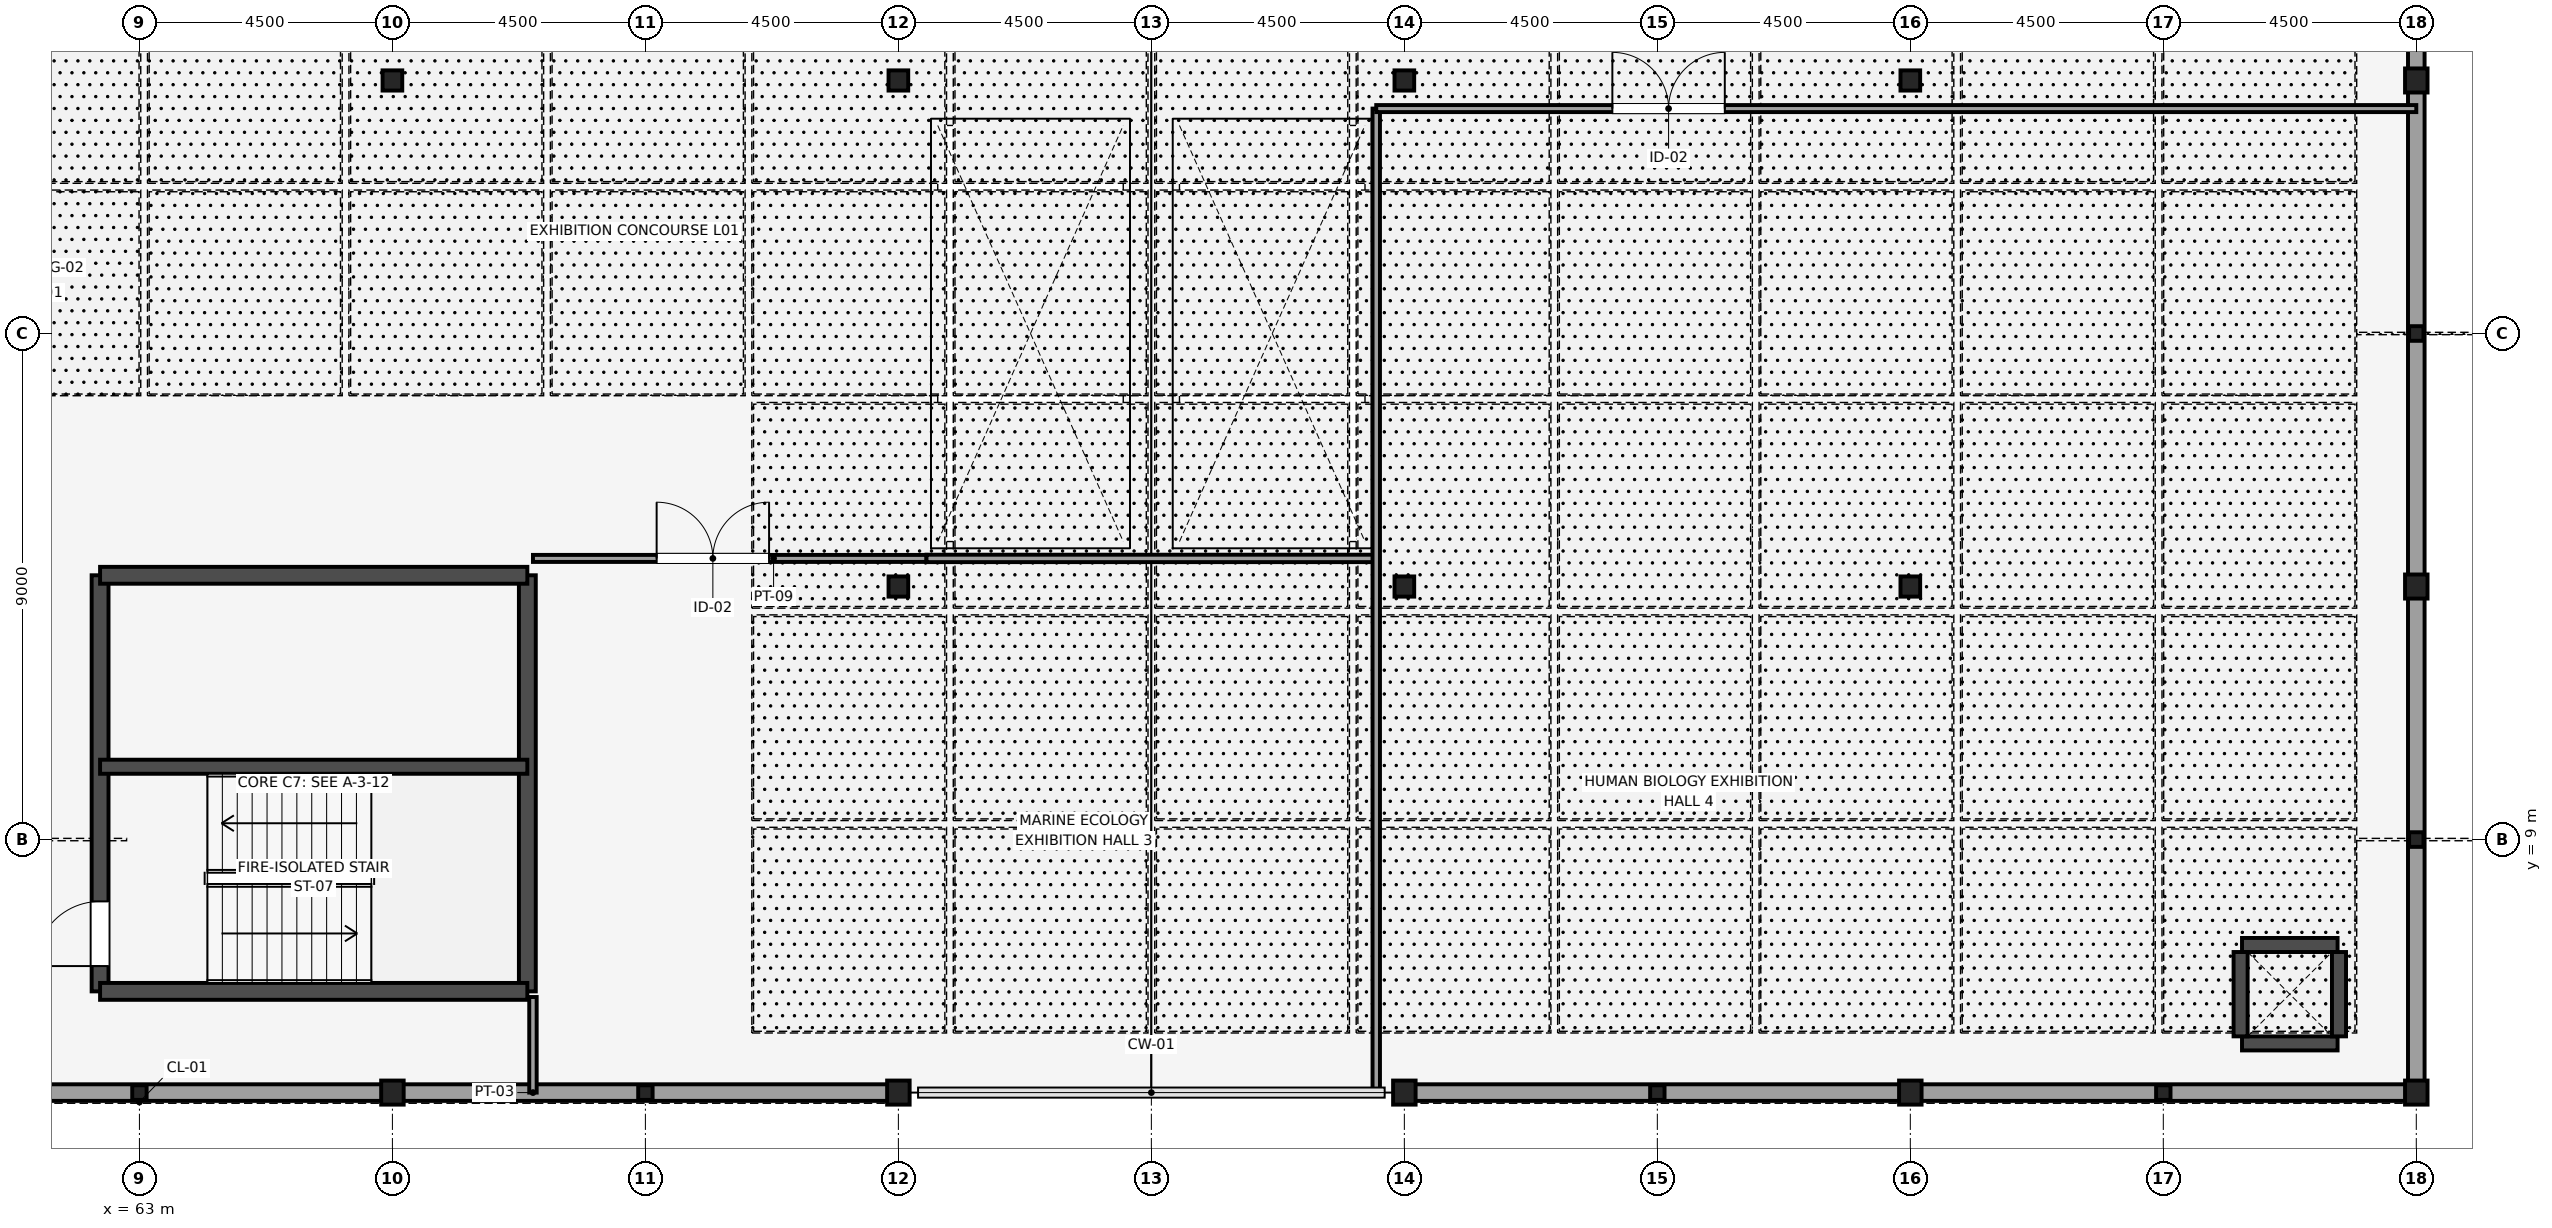
"""IFC4 building model, lengths in metres.
Left out: names, types, materials, properties, quantities, classifications, styles, units other than length and angle.
Written with IfcOpenShell. Run it as: python <this file> out.ifc"""

import sys

from ifc_helpers import new_model, si_unit, direction, frame, frame_2d, origin, origin_2d, place, context, subcontext, project, spatial, rectangle, i_section, extrude, element, fill, save


model = new_model("IFC4")
c1 = context("Model", 3, precision=1e-05, world=origin(), true_north=direction((0.0, 1.0)))
c2 = subcontext(c1, "Body", "Model", "MODEL_VIEW")
j1 = project(units=[si_unit("LENGTHUNIT", "METRE"), si_unit("PLANEANGLEUNIT", "RADIAN")], contexts=[c1])
p1 = place(None, origin())
s1 = spatial("IfcSite", under=j1, at=p1, CompositionType="ELEMENT")
p2 = place(p1, origin())
s2 = spatial("IfcBuilding", under=s1, at=p2, CompositionType="ELEMENT")
p3 = place(p2, frame((0.0, 0.0, 5.4)))
s3 = spatial("IfcBuildingStorey", under=s2, at=p3, CompositionType="ELEMENT", Elevation=5.4)
p4 = place(p3, frame((67.5, 4.5, 0.0), z_axis=(0.0, 0.0, 1.0), x_axis=(1.0, 0.0, 0.0)))
e1 = element("IfcColumn", 1, at=p4, inside=s3, PredefinedType="COLUMN", context=c2, shape_type="SweptSolid", body=[
    extrude(i_section(OverallWidth=0.4, OverallDepth=0.428, WebThickness=0.02, FlangeThickness=0.028, FilletRadius=0.016, at=origin_2d()), origin(), (0.0, 0.0, 1.0), 4.5),
])
p5 = place(p3, frame((67.5, 22.5, 0.0), z_axis=(0.0, 0.0, 1.0), x_axis=(1.0, 0.0, 0.0)))
e2 = element("IfcColumn", 2, at=p5, inside=s3, PredefinedType="COLUMN", context=c2, shape_type="SweptSolid", body=[
    extrude(i_section(OverallWidth=0.35, OverallDepth=0.359, WebThickness=0.016, FlangeThickness=0.024, FilletRadius=0.014, at=origin_2d()), origin(), (0.0, 0.0, 1.0), 4.5),
])
p6 = place(p3, frame((76.5, 4.5, 0.0), z_axis=(0.0, 0.0, 1.0), x_axis=(1.0, 0.0, 0.0)))
e3 = element("IfcColumn", 3, at=p6, inside=s3, PredefinedType="COLUMN", context=c2, shape_type="SweptSolid", body=[
    extrude(i_section(OverallWidth=0.4, OverallDepth=0.428, WebThickness=0.02, FlangeThickness=0.028, FilletRadius=0.016, at=origin_2d()), origin(), (0.0, 0.0, 1.0), 4.5),
])
for number, where, z_axis, x_axis in (
    (4, (76.5, 13.5, 0.0), (0.0, 0.0, 1.0), (1.0, 0.0, 0.0)),
    (5, (76.5, 22.5, 0.0), (0.0, 0.0, 1.0), (1.0, 0.0, 0.0)),
):
    element("IfcColumn", number, at=place(p3, frame(where, z_axis=z_axis, x_axis=x_axis)), inside=s3, PredefinedType="COLUMN", context=c2, shape_type="SweptSolid", body=[
        extrude(i_section(OverallWidth=0.35, OverallDepth=0.359, WebThickness=0.016, FlangeThickness=0.024, FilletRadius=0.014, at=origin_2d()), origin(), (0.0, 0.0, 1.0), 4.5),
    ])
p7 = place(p3, frame((85.5, 4.5, 0.0), z_axis=(0.0, 0.0, 1.0), x_axis=(1.0, 0.0, 0.0)))
e6 = element("IfcColumn", 6, at=p7, inside=s3, PredefinedType="COLUMN", context=c2, shape_type="SweptSolid", body=[
    extrude(i_section(OverallWidth=0.4, OverallDepth=0.428, WebThickness=0.02, FlangeThickness=0.028, FilletRadius=0.016, at=origin_2d()), origin(), (0.0, 0.0, 1.0), 4.5),
])
for number, where, z_axis, x_axis in (
    (7, (85.5, 13.5, 0.0), (0.0, 0.0, 1.0), (1.0, 0.0, 0.0)),
    (8, (85.5, 22.5, 0.0), (0.0, 0.0, 1.0), (1.0, 0.0, 0.0)),
):
    element("IfcColumn", number, at=place(p3, frame(where, z_axis=z_axis, x_axis=x_axis)), inside=s3, PredefinedType="COLUMN", context=c2, shape_type="SweptSolid", body=[
        extrude(i_section(OverallWidth=0.35, OverallDepth=0.359, WebThickness=0.016, FlangeThickness=0.024, FilletRadius=0.014, at=origin_2d()), origin(), (0.0, 0.0, 1.0), 4.5),
    ])
p8 = place(p3, frame((94.5, 4.5, 0.0), z_axis=(0.0, 0.0, 1.0), x_axis=(1.0, 0.0, 0.0)))
e9 = element("IfcColumn", 9, at=p8, inside=s3, PredefinedType="COLUMN", context=c2, shape_type="SweptSolid", body=[
    extrude(i_section(OverallWidth=0.4, OverallDepth=0.428, WebThickness=0.02, FlangeThickness=0.028, FilletRadius=0.016, at=origin_2d()), origin(), (0.0, 0.0, 1.0), 4.5),
])
for number, where, z_axis, x_axis in (
    (10, (94.5, 13.5, 0.0), (0.0, 0.0, 1.0), (1.0, 0.0, 0.0)),
    (11, (94.5, 22.5, 0.0), (0.0, 0.0, 1.0), (1.0, 0.0, 0.0)),
):
    element("IfcColumn", number, at=place(p3, frame(where, z_axis=z_axis, x_axis=x_axis)), inside=s3, PredefinedType="COLUMN", context=c2, shape_type="SweptSolid", body=[
        extrude(i_section(OverallWidth=0.35, OverallDepth=0.359, WebThickness=0.016, FlangeThickness=0.024, FilletRadius=0.014, at=origin_2d()), origin(), (0.0, 0.0, 1.0), 4.5),
    ])
for number, where, z_axis, x_axis in (
    (12, (103.5, 4.5, 0.0), (0.0, 0.0, 1.0), (1.0, 0.0, 0.0)),
    (13, (103.5, 13.5, 0.0), (0.0, 0.0, 1.0), (1.0, 0.0, 0.0)),
    (14, (103.5, 22.5, 0.0), (0.0, 0.0, 1.0), (1.0, 0.0, 0.0)),
):
    element("IfcColumn", number, at=place(p3, frame(where, z_axis=z_axis, x_axis=x_axis)), inside=s3, PredefinedType="COLUMN", context=c2, shape_type="SweptSolid", body=[
        extrude(i_section(OverallWidth=0.4, OverallDepth=0.428, WebThickness=0.02, FlangeThickness=0.028, FilletRadius=0.016, at=origin_2d()), origin(), (0.0, 0.0, 1.0), 4.5),
    ])
for number, where, z_axis, x_axis in (
    (15, (63.0, 4.5, 0.0), (0.0, 0.0, 1.0), (1.0, 0.0, 0.0)),
    (16, (72.0, 4.5, 0.0), (0.0, 0.0, 1.0), (1.0, 0.0, 0.0)),
    (17, (90.0, 4.5, 0.0), (0.0, 0.0, 1.0), (1.0, 0.0, 0.0)),
    (18, (99.0, 4.5, 0.0), (0.0, 0.0, 1.0), (1.0, 0.0, 0.0)),
    (19, (103.5, 9.0, 0.0), (0.0, 0.0, 1.0), (1.0, 0.0, 0.0)),
    (20, (103.5, 18.0, 0.0), (0.0, 0.0, 1.0), (1.0, 0.0, 0.0)),
):
    element("IfcColumn", number, at=place(p3, frame(where, z_axis=z_axis, x_axis=x_axis)), inside=s3, PredefinedType="PILASTER", context=c2, shape_type="SweptSolid", body=[
        extrude(i_section(OverallWidth=0.256, OverallDepth=0.26, WebThickness=0.01, FlangeThickness=0.017, FilletRadius=0.014, at=origin_2d()), origin(), (0.0, 0.0, 1.0), 4.5),
    ])
p9 = place(p3, frame((62.3, 6.3, 0.0), z_axis=(0.0, 0.0, 1.0), x_axis=(0.0, 1.0, 0.0)))
e21 = element("IfcWall", 21, at=p9, inside=s3, PredefinedType="SHEAR", context=c2, shape_type="SweptSolid", body=[
    extrude(rectangle(XDim=7.4, YDim=0.3, at=frame_2d((3.7, 0.0))), origin(), (0.0, 0.0, 1.0), 4.5),
])
p10 = place(p9, frame((0.45, 0.0, 0.0)))
e22 = element("IfcOpeningElement", 22, at=p10, cuts=e21, PredefinedType="OPENING", context=c2, shape_type="SweptSolid", body=[
    extrude(rectangle(XDim=1.15, YDim=2.15, at=frame_2d((0.575, 1.075))), frame((0.0, 0.16, 0.0), z_axis=(0.0, -1.0, 0.0), x_axis=(1.0, 0.0, 0.0)), (0.0, 0.0, 1.0), 0.32),
])
p11 = place(p3, frame((69.9, 6.3, 0.0), z_axis=(0.0, 0.0, 1.0), x_axis=(0.0, 1.0, 0.0)))
e23 = element("IfcWall", 23, at=p11, inside=s3, PredefinedType="SHEAR", context=c2, shape_type="SweptSolid", body=[
    extrude(rectangle(XDim=7.4, YDim=0.3, at=frame_2d((3.7, 0.0))), origin(), (0.0, 0.0, 1.0), 4.5),
])
for number, where, z_axis, x_axis in (
    (24, (62.3, 6.3, 0.0), (0.0, 0.0, 1.0), (1.0, 0.0, 0.0)),
    (25, (62.3, 13.7, 0.0), (0.0, 0.0, 1.0), (1.0, 0.0, 0.0)),
):
    element("IfcWall", number, at=place(p3, frame(where, z_axis=z_axis, x_axis=x_axis)), inside=s3, PredefinedType="SHEAR", context=c2, shape_type="SweptSolid", body=[
        extrude(rectangle(XDim=7.6, YDim=0.3, at=frame_2d((3.8, 0.0))), origin(), (0.0, 0.0, 1.0), 4.5),
    ])
p12 = place(p3, frame((62.3, 10.295, 0.0), z_axis=(0.0, 0.0, 1.0), x_axis=(1.0, 0.0, 0.0)))
e26 = element("IfcWall", 26, at=p12, inside=s3, PredefinedType="SHEAR", context=c2, shape_type="SweptSolid", body=[
    extrude(rectangle(XDim=7.6, YDim=0.25, at=frame_2d((3.8, 0.0))), origin(), (0.0, 0.0, 1.0), 4.5),
])
for number, where, z_axis, x_axis in (
    (27, (100.4, 5.375, 0.0), (0.0, 0.0, 1.0), (1.0, 0.0, 0.0)),
    (28, (100.4, 7.125, 0.0), (0.0, 0.0, 1.0), (1.0, 0.0, 0.0)),
):
    element("IfcWall", number, at=place(p3, frame(where, z_axis=z_axis, x_axis=x_axis)), inside=s3, PredefinedType="SHEAR", context=c2, shape_type="SweptSolid", body=[
        extrude(rectangle(XDim=1.7, YDim=0.25, at=frame_2d((0.85, 0.0))), origin(), (0.0, 0.0, 1.0), 3.77),
    ])
for number, where, z_axis, x_axis in (
    (29, (100.375, 5.5, 0.0), (0.0, 0.0, 1.0), (0.0, 1.0, 0.0)),
    (30, (102.125, 5.5, 0.0), (0.0, 0.0, 1.0), (0.0, 1.0, 0.0)),
):
    element("IfcWall", number, at=place(p3, frame(where, z_axis=z_axis, x_axis=x_axis)), inside=s3, PredefinedType="SHEAR", context=c2, shape_type="SweptSolid", body=[
        extrude(rectangle(XDim=1.5, YDim=0.25, at=frame_2d((0.75, 0.0))), origin(), (0.0, 0.0, 1.0), 3.77),
    ])
for number, where, z_axis, x_axis in (
    (31, (58.5, 4.5, 0.0), (0.0, 0.0, 1.0), (1.0, 0.0, 0.0)),
    (32, (67.5, 4.5, 0.0), (0.0, 0.0, 1.0), (1.0, 0.0, 0.0)),
    (33, (85.5, 4.5, 0.0), (0.0, 0.0, 1.0), (1.0, 0.0, 0.0)),
    (34, (94.5, 4.5, 0.0), (0.0, 0.0, 1.0), (1.0, 0.0, 0.0)),
    (35, (103.5, 4.5, 0.0), (0.0, 0.0, 1.0), (0.0, 1.0, 0.0)),
    (36, (103.5, 13.5, 0.0), (0.0, 0.0, 1.0), (0.0, 1.0, 0.0)),
    (37, (103.5, 22.5, 0.0), (0.0, 0.0, 1.0), (0.0, 1.0, 0.0)),
):
    element("IfcWall", number, at=place(p3, frame(where, z_axis=z_axis, x_axis=x_axis)), inside=s3, PredefinedType="STANDARD", context=c2, shape_type="SweptSolid", body=[
        extrude(rectangle(XDim=9.0, YDim=0.295, at=frame_2d((4.5, 0.0))), origin(), (0.0, 0.0, 1.0), 3.846),
    ])
p13 = place(p3, frame((70.0, 4.5, 0.0), z_axis=(0.0, 0.0, 1.0), x_axis=(0.0, 1.0, 0.0)))
e38 = element("IfcWall", 38, at=p13, inside=s3, PredefinedType="PARTITIONING", context=c2, shape_type="SweptSolid", body=[
    extrude(rectangle(XDim=1.7, YDim=0.132, at=frame_2d((0.85, 0.0))), origin(), (0.0, 0.0, 1.0), 4.32),
])
p14 = place(p3, frame((70.0, 14.0, 0.0), z_axis=(0.0, 0.0, 1.0), x_axis=(1.0, 0.0, 0.0)))
e39 = element("IfcWall", 39, at=p14, inside=s3, PredefinedType="MOVABLE", context=c2, shape_type="SweptSolid", body=[
    extrude(rectangle(XDim=7.0, YDim=0.125, at=frame_2d((3.5, 0.0))), origin(), (0.0, 0.0, 1.0), 4.32),
])
p15 = place(p14, frame((2.2, 0.0, 0.0)))
e40 = element("IfcOpeningElement", 40, at=p15, cuts=e39, PredefinedType="OPENING", context=c2, shape_type="SweptSolid", body=[
    extrude(rectangle(XDim=2.0, YDim=2.4, at=frame_2d((1.0, 1.2))), frame((0.0, 0.073, 0.0), z_axis=(0.0, -1.0, 0.0), x_axis=(1.0, 0.0, 0.0)), (0.0, 0.0, 1.0), 0.145),
])
p16 = place(p3, frame((77.0, 14.0, 0.0), z_axis=(0.0, 0.0, 1.0), x_axis=(1.0, 0.0, 0.0)))
e41 = element("IfcWall", 41, at=p16, inside=s3, PredefinedType="PARTITIONING", context=c2, shape_type="SweptSolid", body=[
    extrude(rectangle(XDim=8.0, YDim=0.132, at=frame_2d((4.0, 0.0))), origin(), (0.0, 0.0, 1.0), 4.32),
])
p17 = place(p3, frame((85.0, 4.5, 0.0), z_axis=(0.0, 0.0, 1.0), x_axis=(0.0, 1.0, 0.0)))
e42 = element("IfcWall", 42, at=p17, inside=s3, PredefinedType="PARTITIONING", context=c2, shape_type="SweptSolid", body=[
    extrude(rectangle(XDim=17.5, YDim=0.132, at=frame_2d((8.75, 0.0))), origin(), (0.0, 0.0, 1.0), 4.32),
])
p18 = place(p3, frame((85.0, 22.0, 0.0), z_axis=(0.0, 0.0, 1.0), x_axis=(1.0, 0.0, 0.0)))
e43 = element("IfcWall", 43, at=p18, inside=s3, PredefinedType="MOVABLE", context=c2, shape_type="SweptSolid", body=[
    extrude(rectangle(XDim=18.5, YDim=0.125, at=frame_2d((9.25, 0.0))), origin(), (0.0, 0.0, 1.0), 4.32),
])
p19 = place(p18, frame((4.2, 0.0, 0.0)))
e44 = element("IfcOpeningElement", 44, at=p19, cuts=e43, PredefinedType="OPENING", context=c2, shape_type="SweptSolid", body=[
    extrude(rectangle(XDim=2.0, YDim=2.4, at=frame_2d((1.0, 1.2))), frame((0.0, 0.073, 0.0), z_axis=(0.0, -1.0, 0.0), x_axis=(1.0, 0.0, 0.0)), (0.0, 0.0, 1.0), 0.145),
])
p20 = place(p10, origin())
e45 = element("IfcDoor", 45, at=p20, inside=s3, OperationType="SINGLE_SWING_LEFT", PredefinedType="DOOR", context=c2, shape_type="SweptSolid", body=[
    extrude(rectangle(XDim=1.15, YDim=2.15, at=frame_2d((0.575, 1.075))), frame((0.0, 0.025, 0.0), z_axis=(0.0, -1.0, 0.0), x_axis=(1.0, 0.0, 0.0)), (0.0, 0.0, 1.0), 0.05),
])
fill(e22, e45)
p21 = place(p15, origin())
e46 = element("IfcDoor", 46, at=p21, inside=s3, OperationType="DOUBLE_DOOR_DOUBLE_SWING", PredefinedType="DOOR", context=c2, shape_type="SweptSolid", body=[
    extrude(rectangle(XDim=2.0, YDim=2.4, at=frame_2d((1.0, 1.2))), frame((0.0, 0.025, 0.0), z_axis=(0.0, -1.0, 0.0), x_axis=(1.0, 0.0, 0.0)), (0.0, 0.0, 1.0), 0.05),
])
fill(e40, e46)
p22 = place(p19, origin())
e47 = element("IfcDoor", 47, at=p22, inside=s3, OperationType="DOUBLE_DOOR_DOUBLE_SWING", PredefinedType="DOOR", context=c2, shape_type="SweptSolid", body=[
    extrude(rectangle(XDim=2.0, YDim=2.4, at=frame_2d((1.0, 1.2))), frame((0.0, 0.025, 0.0), z_axis=(0.0, -1.0, 0.0), x_axis=(1.0, 0.0, 0.0)), (0.0, 0.0, 1.0), 0.05),
])
fill(e44, e47)
save(model, sys.argv[1])
